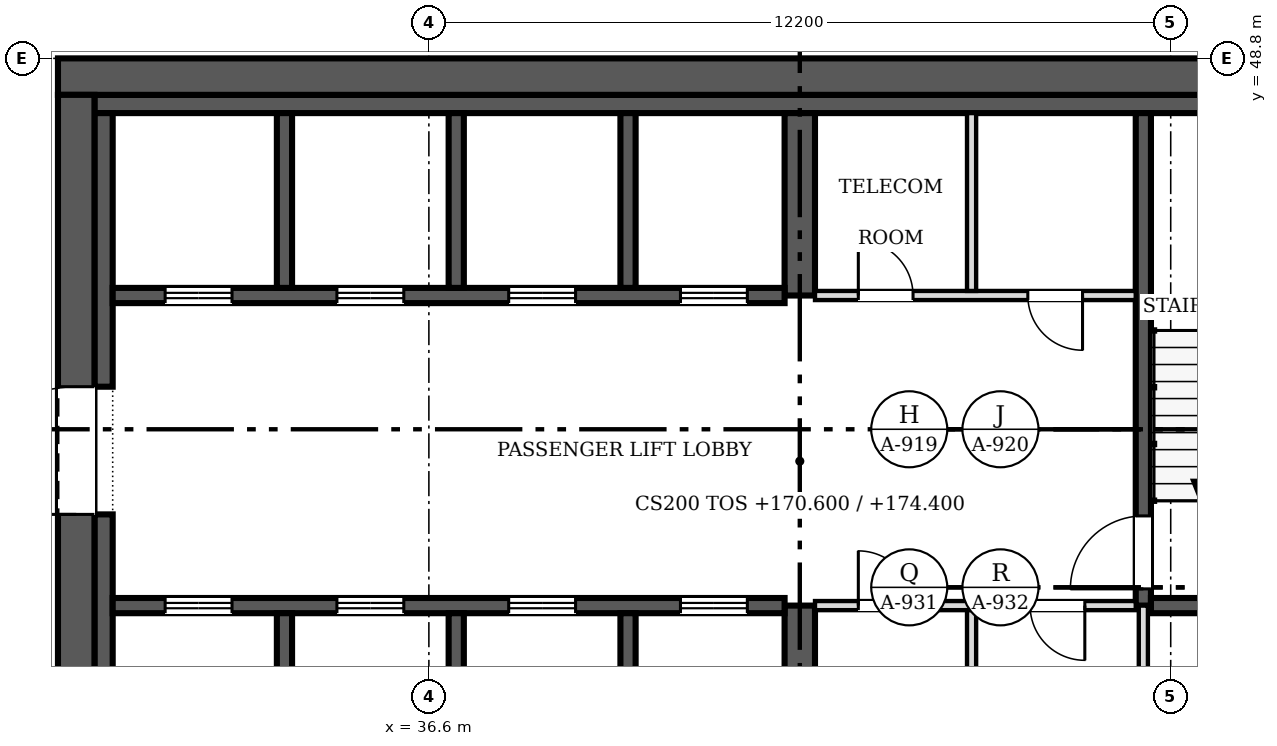
"""IFC4 building model, lengths in metres.
Left out: names, types, materials, properties, quantities, classifications, styles, units other than length and angle.
Written with IfcOpenShell. Run it as: python <this file> out.ifc"""

import sys

from ifc_helpers import new_model, si_unit, direction, frame, frame_2d, origin, place, context, subcontext, project, spatial, rectangle, extrude, source, transform, mapped, element, fill, save


model = new_model("IFC4")
c1 = context("Model", 3, precision=1e-05, world=origin(), true_north=direction((0.0, 1.0)))
c2 = subcontext(c1, "Body", "Model", "MODEL_VIEW")
j1 = project(units=[si_unit("LENGTHUNIT", "METRE"), si_unit("PLANEANGLEUNIT", "RADIAN")], contexts=[c1])
p1 = place(None, origin())
s1 = spatial("IfcSite", under=j1, at=p1, CompositionType="ELEMENT")
p2 = place(p1, origin())
s2 = spatial("IfcBuilding", under=s1, at=p2, CompositionType="ELEMENT")
p3 = place(p2, frame((0.0, 0.0, 170.6)))
s3 = spatial("IfcBuildingStorey", under=s2, at=p3, CompositionType="ELEMENT", Elevation=170.6)
p4 = place(p3, frame((30.8, 25.0, 0.0), z_axis=(0.0, 0.0, 1.0), x_axis=(0.0, 1.0, 0.0)))
e1 = element("IfcWall", 1, at=p4, inside=s3, PredefinedType="SHEAR", context=c2, shape_type="SweptSolid", body=[
    extrude(rectangle(XDim=23.2, YDim=0.6, at=frame_2d((11.6, 0.0))), origin(), (0.0, 0.0, 1.0), 3.8),
])
m1 = source(origin(), c2, "Body", "SweptSolid", [
    extrude(rectangle(XDim=2.1, YDim=2.4, at=frame_2d((1.05, 1.2))), frame((0.0, 0.31, 0.0), z_axis=(0.0, -1.0, 0.0), x_axis=(1.0, 0.0, 0.0)), (0.0, 0.0, 1.0), 0.62),
])
p5 = place(p4, frame((4.8, 0.0, 0.0)))
e2 = element("IfcOpeningElement", 2, at=p5, cuts=e1, PredefinedType="OPENING", context=c2, shape_type="MappedRepresentation", body=[
    mapped(m1, transform((0.0, 0.0, 0.0), scale=1.0)),
])
p6 = place(p4, frame((16.3, 0.0, 0.0)))
e3 = element("IfcOpeningElement", 3, at=p6, cuts=e1, PredefinedType="OPENING", context=c2, shape_type="MappedRepresentation", body=[
    mapped(m1, transform((0.0, 0.0, 0.0), scale=1.0)),
])
p7 = place(p3, frame((30.5, 48.5, 0.0), z_axis=(0.0, 0.0, 1.0), x_axis=(1.0, 0.0, 0.0)))
e4 = element("IfcWall", 4, at=p7, inside=s3, PredefinedType="SHEAR", context=c2, shape_type="SweptSolid", body=[
    extrude(rectangle(XDim=24.4, YDim=0.6, at=frame_2d((12.2, 0.0))), origin(), (0.0, 0.0, 1.0), 3.8),
])
p8 = place(p3, frame((31.1, 48.05, 0.0), z_axis=(0.0, 0.0, 1.0), x_axis=(1.0, 0.0, 0.0)))
e5 = element("IfcWall", 5, at=p8, inside=s3, PredefinedType="SOLIDWALL", context=c2, shape_type="SweptSolid", body=[
    extrude(rectangle(XDim=23.2, YDim=0.3, at=frame_2d((11.6, 0.0))), origin(), (0.0, 0.0, 1.0), 3.8),
])
p9 = place(p3, frame((31.25, 31.9, 0.0), z_axis=(0.0, 0.0, 1.0), x_axis=(0.0, 1.0, 0.0)))
e6 = element("IfcWall", 6, at=p9, inside=s3, PredefinedType="SOLIDWALL", context=c2, shape_type="SweptSolid", body=[
    extrude(rectangle(XDim=9.4, YDim=0.3, at=frame_2d((4.7, 0.0))), origin(), (0.0, 0.0, 1.0), 3.8),
])
p10 = place(p3, frame((31.25, 43.4, 0.0), z_axis=(0.0, 0.0, 1.0), x_axis=(0.0, 1.0, 0.0)))
e7 = element("IfcWall", 7, at=p10, inside=s3, PredefinedType="SOLIDWALL", context=c2, shape_type="SweptSolid", body=[
    extrude(rectangle(XDim=4.5, YDim=0.3, at=frame_2d((2.25, 0.0))), origin(), (0.0, 0.0, 1.0), 3.8),
])
p11 = place(p3, frame((42.7, 36.85, 0.0), z_axis=(0.0, 0.0, 1.0), x_axis=(0.0, 1.0, 0.0)))
e8 = element("IfcWall", 8, at=p11, inside=s3, PredefinedType="SHEAR", context=c2, shape_type="SweptSolid", body=[
    extrude(rectangle(XDim=2.95, YDim=0.5, at=frame_2d((1.475, 0.0))), origin(), (0.0, 0.0, 1.0), 3.8),
])
p12 = place(p3, frame((42.7, 44.9, 0.0), z_axis=(0.0, 0.0, 1.0), x_axis=(0.0, 1.0, 0.0)))
e9 = element("IfcWall", 9, at=p12, inside=s3, PredefinedType="SHEAR", context=c2, shape_type="SweptSolid", body=[
    extrude(rectangle(XDim=3.0, YDim=0.5, at=frame_2d((1.5, 0.0))), origin(), (0.0, 0.0, 1.0), 3.8),
])
p13 = place(p3, frame((31.4, 39.8, 0.0), z_axis=(0.0, 0.0, 1.0), x_axis=(1.0, 0.0, 0.0)))
e10 = element("IfcWall", 10, at=p13, inside=s3, PredefinedType="SOLIDWALL", context=c2, shape_type="SweptSolid", body=[
    extrude(rectangle(XDim=11.05, YDim=0.25, at=frame_2d((5.525, 0.0))), origin(), (0.0, 0.0, 1.0), 3.8),
])
m2 = source(origin(), c2, "Body", "SweptSolid", [
    extrude(rectangle(XDim=1.1, YDim=2.1, at=frame_2d((0.55, 1.05))), frame((0.0, 0.135, 0.0), z_axis=(0.0, -1.0, 0.0), x_axis=(1.0, 0.0, 0.0)), (0.0, 0.0, 1.0), 0.27),
])
p14 = place(p13, frame((0.863, 0.0, 0.0)))
e11 = element("IfcOpeningElement", 11, at=p14, cuts=e10, PredefinedType="OPENING", context=c2, shape_type="MappedRepresentation", body=[
    mapped(m2, transform((0.0, 0.0, 0.0), scale=1.0)),
])
p15 = place(p13, frame((3.688, 0.0, 0.0)))
e12 = element("IfcOpeningElement", 12, at=p15, cuts=e10, PredefinedType="OPENING", context=c2, shape_type="MappedRepresentation", body=[
    mapped(m2, transform((0.0, 0.0, 0.0), scale=1.0)),
])
p16 = place(p13, frame((6.512, 0.0, 0.0)))
e13 = element("IfcOpeningElement", 13, at=p16, cuts=e10, PredefinedType="OPENING", context=c2, shape_type="MappedRepresentation", body=[
    mapped(m2, transform((0.0, 0.0, 0.0), scale=1.0)),
])
p17 = place(p13, frame((9.337, 0.0, 0.0)))
e14 = element("IfcOpeningElement", 14, at=p17, cuts=e10, PredefinedType="OPENING", context=c2, shape_type="MappedRepresentation", body=[
    mapped(m2, transform((0.0, 0.0, 0.0), scale=1.0)),
])
p18 = place(p3, frame((42.45, 44.9, 0.0), z_axis=(0.0, 0.0, 1.0), x_axis=(-1.0, 0.0, 0.0)))
e15 = element("IfcWall", 15, at=p18, inside=s3, PredefinedType="SOLIDWALL", context=c2, shape_type="SweptSolid", body=[
    extrude(rectangle(XDim=11.05, YDim=0.25, at=frame_2d((5.525, 0.0))), origin(), (0.0, 0.0, 1.0), 3.8),
])
p19 = place(p18, frame((9.087, 0.0, 0.0)))
e16 = element("IfcOpeningElement", 16, at=p19, cuts=e15, PredefinedType="OPENING", context=c2, shape_type="MappedRepresentation", body=[
    mapped(m2, transform((0.0, 0.0, 0.0), scale=1.0)),
])
p20 = place(p18, frame((6.262, 0.0, 0.0)))
e17 = element("IfcOpeningElement", 17, at=p20, cuts=e15, PredefinedType="OPENING", context=c2, shape_type="MappedRepresentation", body=[
    mapped(m2, transform((0.0, 0.0, 0.0), scale=1.0)),
])
p21 = place(p18, frame((3.438, 0.0, 0.0)))
e18 = element("IfcOpeningElement", 18, at=p21, cuts=e15, PredefinedType="OPENING", context=c2, shape_type="MappedRepresentation", body=[
    mapped(m2, transform((0.0, 0.0, 0.0), scale=1.0)),
])
p22 = place(p18, frame((0.613, 0.0, 0.0)))
e19 = element("IfcOpeningElement", 19, at=p22, cuts=e15, PredefinedType="OPENING", context=c2, shape_type="MappedRepresentation", body=[
    mapped(m2, transform((0.0, 0.0, 0.0), scale=1.0)),
])
p23 = place(p3, frame((48.35, 47.9, 0.0), z_axis=(0.0, 0.0, 1.0), x_axis=(0.0, -1.0, 0.0)))
e20 = element("IfcWall", 20, at=p23, inside=s3, PredefinedType="SOLIDWALL", context=c2, shape_type="SweptSolid", body=[
    extrude(rectangle(XDim=8.1, YDim=0.25, at=frame_2d((4.05, 0.0))), origin(), (0.0, 0.0, 1.0), 3.8),
])
m3 = source(origin(), c2, "Body", "SweptSolid", [
    extrude(rectangle(XDim=1.2, YDim=2.1, at=frame_2d((0.6, 1.05))), frame((0.0, 0.135, 0.0), z_axis=(0.0, -1.0, 0.0), x_axis=(1.0, 0.0, 0.0)), (0.0, 0.0, 1.0), 0.27),
])
p24 = place(p23, frame((6.625, 0.0, 0.0)))
e21 = element("IfcOpeningElement", 21, at=p24, cuts=e20, PredefinedType="OPENING", context=c2, shape_type="MappedRepresentation", body=[
    mapped(m3, transform((0.0, 0.0, 0.0), scale=1.0)),
])
p25 = place(p3, frame((48.475, 39.8, 0.0), z_axis=(0.0, 0.0, 1.0), x_axis=(1.0, 0.0, 0.0)))
e22 = element("IfcWall", 22, at=p25, inside=s3, PredefinedType="SOLIDWALL", context=c2, shape_type="SweptSolid", body=[
    extrude(rectangle(XDim=3.4, YDim=0.25, at=frame_2d((1.7, 0.0))), origin(), (0.0, 0.0, 1.0), 3.8),
])
for number, where, z_axis, x_axis in (
    (23, (34.225, 36.85, 0.0), (0.0, 0.0, 1.0), (0.0, 1.0, 0.0)),
    (24, (37.05, 36.85, 0.0), (0.0, 0.0, 1.0), (0.0, 1.0, 0.0)),
    (25, (39.875, 36.85, 0.0), (0.0, 0.0, 1.0), (0.0, 1.0, 0.0)),
):
    element("IfcWall", number, at=place(p3, frame(where, z_axis=z_axis, x_axis=x_axis)), inside=s3, PredefinedType="SOLIDWALL", context=c2, shape_type="SweptSolid", body=[
        extrude(rectangle(XDim=2.825, YDim=0.25, at=frame_2d((1.413, 0.0))), origin(), (0.0, 0.0, 1.0), 3.8),
    ])
for number, where, z_axis, x_axis in (
    (26, (34.225, 45.025, 0.0), (0.0, 0.0, 1.0), (0.0, 1.0, 0.0)),
    (27, (37.05, 45.025, 0.0), (0.0, 0.0, 1.0), (0.0, 1.0, 0.0)),
    (28, (39.875, 45.025, 0.0), (0.0, 0.0, 1.0), (0.0, 1.0, 0.0)),
):
    element("IfcWall", number, at=place(p3, frame(where, z_axis=z_axis, x_axis=x_axis)), inside=s3, PredefinedType="SOLIDWALL", context=c2, shape_type="SweptSolid", body=[
        extrude(rectangle(XDim=2.875, YDim=0.25, at=frame_2d((1.438, 0.0))), origin(), (0.0, 0.0, 1.0), 3.8),
    ])
p26 = place(p3, frame((48.225, 39.8, 0.0), z_axis=(0.0, 0.0, 1.0), x_axis=(-1.0, 0.0, 0.0)))
e29 = element("IfcWall", 29, at=p26, inside=s3, PredefinedType="PARTITIONING", context=c2, shape_type="SweptSolid", body=[
    extrude(rectangle(XDim=5.275, YDim=0.15, at=frame_2d((2.638, 0.0))), origin(), (0.0, 0.0, 1.0), 3.6),
])
m4 = source(origin(), c2, "Body", "SweptSolid", [
    extrude(rectangle(XDim=0.9, YDim=2.1, at=frame_2d((0.45, 1.05))), frame((0.0, 0.085, 0.0), z_axis=(0.0, -1.0, 0.0), x_axis=(1.0, 0.0, 0.0)), (0.0, 0.0, 1.0), 0.17),
])
p27 = place(p26, frame((3.663, 0.0, 0.0)))
e30 = element("IfcOpeningElement", 30, at=p27, cuts=e29, PredefinedType="OPENING", context=c2, shape_type="MappedRepresentation", body=[
    mapped(m4, transform((0.0, 0.0, 0.0), scale=1.0)),
])
p28 = place(p26, frame((0.837, 0.0, 0.0)))
e31 = element("IfcOpeningElement", 31, at=p28, cuts=e29, PredefinedType="OPENING", context=c2, shape_type="MappedRepresentation", body=[
    mapped(m4, transform((0.0, 0.0, 0.0), scale=1.0)),
])
p29 = place(p3, frame((42.95, 44.9, 0.0), z_axis=(0.0, 0.0, 1.0), x_axis=(1.0, 0.0, 0.0)))
e32 = element("IfcWall", 32, at=p29, inside=s3, PredefinedType="PARTITIONING", context=c2, shape_type="SweptSolid", body=[
    extrude(rectangle(XDim=5.275, YDim=0.15, at=frame_2d((2.638, 0.0))), origin(), (0.0, 0.0, 1.0), 3.6),
])
p30 = place(p29, frame((0.712, 0.0, 0.0)))
e33 = element("IfcOpeningElement", 33, at=p30, cuts=e32, PredefinedType="OPENING", context=c2, shape_type="MappedRepresentation", body=[
    mapped(m4, transform((0.0, 0.0, 0.0), scale=1.0)),
])
p31 = place(p29, frame((3.5, 0.0, 0.0)))
e34 = element("IfcOpeningElement", 34, at=p31, cuts=e32, PredefinedType="OPENING", context=c2, shape_type="MappedRepresentation", body=[
    mapped(m4, transform((0.0, 0.0, 0.0), scale=1.0)),
])
p32 = place(p3, frame((45.525, 36.85, 0.0), z_axis=(0.0, 0.0, 1.0), x_axis=(0.0, 1.0, 0.0)))
e35 = element("IfcWall", 35, at=p32, inside=s3, PredefinedType="PARTITIONING", context=c2, shape_type="SweptSolid", body=[
    extrude(rectangle(XDim=2.875, YDim=0.15, at=frame_2d((1.438, 0.0))), origin(), (0.0, 0.0, 1.0), 3.6),
])
p33 = place(p3, frame((48.35, 36.85, 0.0), z_axis=(0.0, 0.0, 1.0), x_axis=(0.0, 1.0, 0.0)))
e36 = element("IfcWall", 36, at=p33, inside=s3, PredefinedType="PARTITIONING", context=c2, shape_type="SweptSolid", body=[
    extrude(rectangle(XDim=2.95, YDim=0.15, at=frame_2d((1.475, 0.0))), origin(), (0.0, 0.0, 1.0), 3.6),
])
p34 = place(p3, frame((45.525, 44.975, 0.0), z_axis=(0.0, 0.0, 1.0), x_axis=(0.0, 1.0, 0.0)))
e37 = element("IfcWall", 37, at=p34, inside=s3, PredefinedType="PARTITIONING", context=c2, shape_type="SweptSolid", body=[
    extrude(rectangle(XDim=2.925, YDim=0.15, at=frame_2d((1.462, 0.0))), origin(), (0.0, 0.0, 1.0), 3.6),
])
m5 = source(origin(), c2, "Body", "SweptSolid", [
    extrude(rectangle(XDim=2.1, YDim=2.4, at=frame_2d((1.05, 1.2))), frame((0.0, 0.025, 0.0), z_axis=(0.0, -1.0, 0.0), x_axis=(1.0, 0.0, 0.0)), (0.0, 0.0, 1.0), 0.05),
])
p35 = place(p6, origin())
e38 = element("IfcDoor", 38, at=p35, inside=s3, OperationType="DOUBLE_DOOR_SINGLE_SWING", PredefinedType="DOOR", context=c2, shape_type="MappedRepresentation", body=[
    mapped(m5, transform((0.0, 0.0, 0.0), scale=1.0)),
])
fill(e3, e38)
m6 = source(origin(), c2, "Body", "SweptSolid", [
    extrude(rectangle(XDim=1.1, YDim=2.1, at=frame_2d((0.55, 1.05))), frame((0.0, 0.025, 0.0), z_axis=(0.0, -1.0, 0.0), x_axis=(1.0, 0.0, 0.0)), (0.0, 0.0, 1.0), 0.05),
])
p36 = place(p14, origin())
e39 = element("IfcDoor", 39, at=p36, inside=s3, OperationType="DOUBLE_DOOR_SLIDING", PredefinedType="DOOR", context=c2, shape_type="MappedRepresentation", body=[
    mapped(m6, transform((0.0, 0.0, 0.0), scale=1.0)),
])
fill(e11, e39)
p37 = place(p15, origin())
e40 = element("IfcDoor", 40, at=p37, inside=s3, OperationType="DOUBLE_DOOR_SLIDING", PredefinedType="DOOR", context=c2, shape_type="MappedRepresentation", body=[
    mapped(m6, transform((0.0, 0.0, 0.0), scale=1.0)),
])
fill(e12, e40)
p38 = place(p16, origin())
e41 = element("IfcDoor", 41, at=p38, inside=s3, OperationType="DOUBLE_DOOR_SLIDING", PredefinedType="DOOR", context=c2, shape_type="MappedRepresentation", body=[
    mapped(m6, transform((0.0, 0.0, 0.0), scale=1.0)),
])
fill(e13, e41)
p39 = place(p17, origin())
e42 = element("IfcDoor", 42, at=p39, inside=s3, OperationType="DOUBLE_DOOR_SLIDING", PredefinedType="DOOR", context=c2, shape_type="MappedRepresentation", body=[
    mapped(m6, transform((0.0, 0.0, 0.0), scale=1.0)),
])
fill(e14, e42)
p40 = place(p19, origin())
e43 = element("IfcDoor", 43, at=p40, inside=s3, OperationType="DOUBLE_DOOR_SLIDING", PredefinedType="DOOR", context=c2, shape_type="MappedRepresentation", body=[
    mapped(m6, transform((0.0, 0.0, 0.0), scale=1.0)),
])
fill(e16, e43)
p41 = place(p20, origin())
e44 = element("IfcDoor", 44, at=p41, inside=s3, OperationType="DOUBLE_DOOR_SLIDING", PredefinedType="DOOR", context=c2, shape_type="MappedRepresentation", body=[
    mapped(m6, transform((0.0, 0.0, 0.0), scale=1.0)),
])
fill(e17, e44)
p42 = place(p21, origin())
e45 = element("IfcDoor", 45, at=p42, inside=s3, OperationType="DOUBLE_DOOR_SLIDING", PredefinedType="DOOR", context=c2, shape_type="MappedRepresentation", body=[
    mapped(m6, transform((0.0, 0.0, 0.0), scale=1.0)),
])
fill(e18, e45)
p43 = place(p22, origin())
e46 = element("IfcDoor", 46, at=p43, inside=s3, OperationType="DOUBLE_DOOR_SLIDING", PredefinedType="DOOR", context=c2, shape_type="MappedRepresentation", body=[
    mapped(m6, transform((0.0, 0.0, 0.0), scale=1.0)),
])
fill(e19, e46)
m7 = source(origin(), c2, "Body", "SweptSolid", [
    extrude(rectangle(XDim=1.2, YDim=2.1, at=frame_2d((0.6, 1.05))), frame((0.0, 0.025, 0.0), z_axis=(0.0, -1.0, 0.0), x_axis=(1.0, 0.0, 0.0)), (0.0, 0.0, 1.0), 0.05),
])
p44 = place(p24, origin())
e47 = element("IfcDoor", 47, at=p44, inside=s3, OperationType="SINGLE_SWING_RIGHT", PredefinedType="DOOR", context=c2, shape_type="MappedRepresentation", body=[
    mapped(m7, transform((0.0, 0.0, 0.0), scale=1.0)),
])
fill(e21, e47)
m8 = source(origin(), c2, "Body", "SweptSolid", [
    extrude(rectangle(XDim=0.9, YDim=2.1, at=frame_2d((0.45, 1.05))), frame((0.0, 0.025, 0.0), z_axis=(0.0, -1.0, 0.0), x_axis=(1.0, 0.0, 0.0)), (0.0, 0.0, 1.0), 0.05),
])
p45 = place(p27, origin())
e48 = element("IfcDoor", 48, at=p45, inside=s3, OperationType="SINGLE_SWING_RIGHT", PredefinedType="DOOR", context=c2, shape_type="MappedRepresentation", body=[
    mapped(m8, transform((0.0, 0.0, 0.0), scale=1.0)),
])
fill(e30, e48)
p46 = place(p28, origin())
e49 = element("IfcDoor", 49, at=p46, inside=s3, OperationType="SINGLE_SWING_LEFT", PredefinedType="DOOR", context=c2, shape_type="MappedRepresentation", body=[
    mapped(m8, transform((0.0, 0.0, 0.0), scale=1.0)),
])
fill(e31, e49)
p47 = place(p30, origin())
e50 = element("IfcDoor", 50, at=p47, inside=s3, OperationType="SINGLE_SWING_LEFT", PredefinedType="DOOR", context=c2, shape_type="MappedRepresentation", body=[
    mapped(m8, transform((0.0, 0.0, 0.0), scale=1.0)),
])
fill(e33, e50)
p48 = place(p31, origin())
e51 = element("IfcDoor", 51, at=p48, inside=s3, OperationType="SINGLE_SWING_RIGHT", PredefinedType="DOOR", context=c2, shape_type="MappedRepresentation", body=[
    mapped(m8, transform((0.0, 0.0, 0.0), scale=1.0)),
])
fill(e34, e51)
save(model, sys.argv[1])
